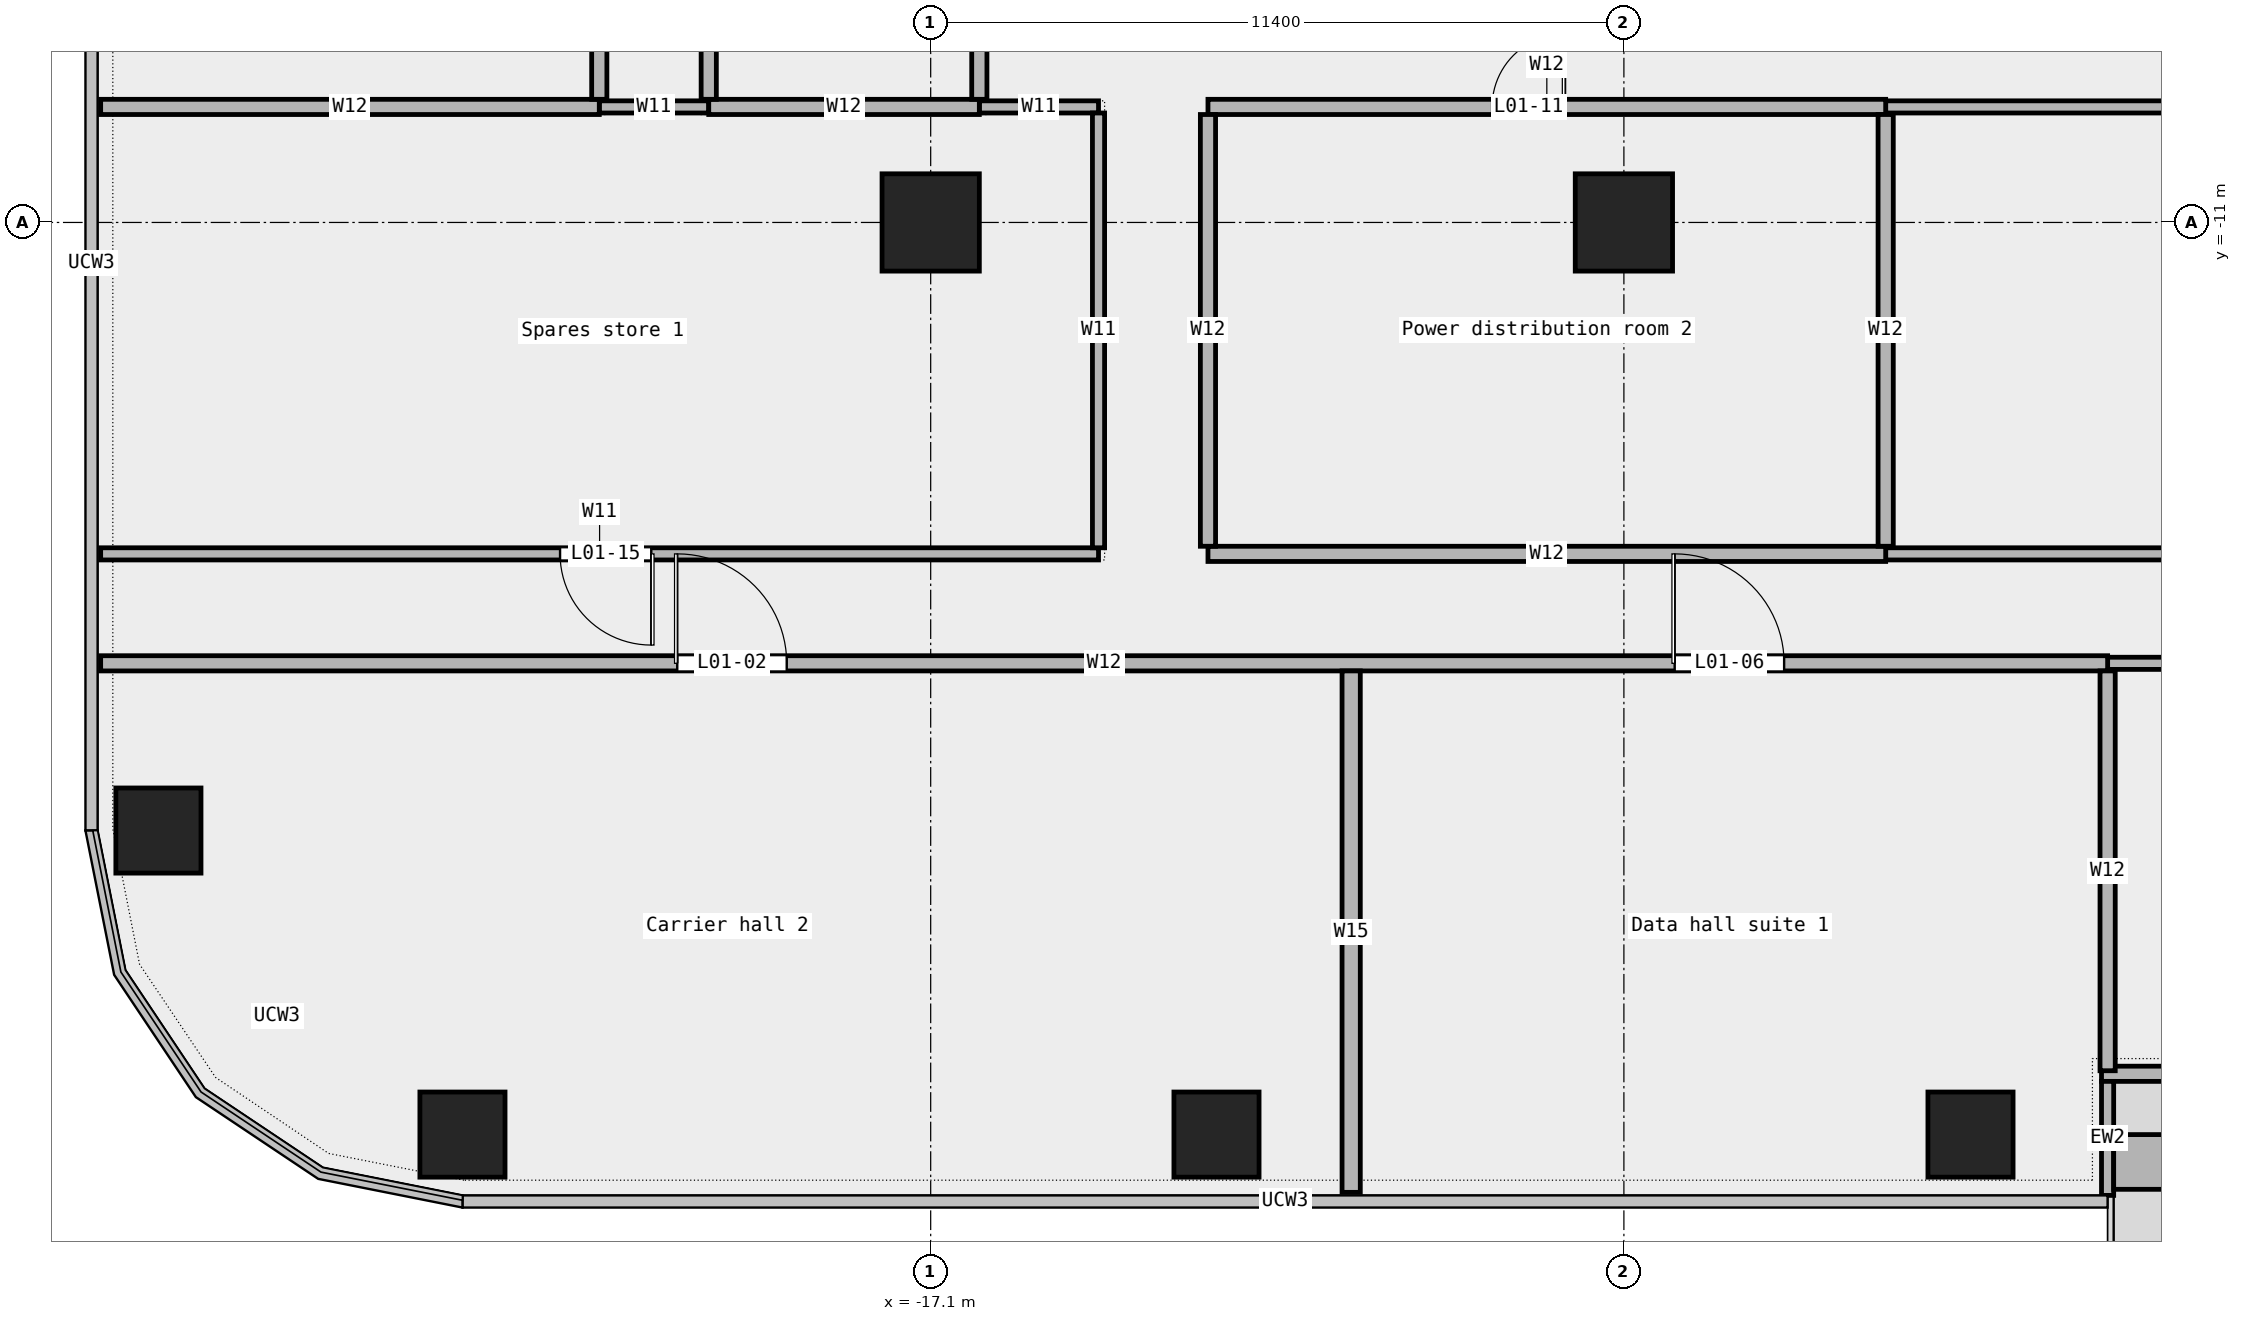
"""IFC4 building model, lengths in metres.
Left out: names, types, materials, properties, quantities, classifications, styles, units other than length and angle.
Written with IfcOpenShell. Run it as: python <this file> out.ifc"""

import sys

from ifc_helpers import new_model, si_unit, direction, frame, frame_2d, origin, origin_2d, place, context, subcontext, project, spatial, rectangle, extrude, element, fill, save


model = new_model("IFC4")
c1 = context("Model", 3, precision=1e-05, world=origin(), true_north=direction((0.0, 1.0)))
c2 = subcontext(c1, "Body", "Model", "MODEL_VIEW")
j1 = project(units=[si_unit("LENGTHUNIT", "METRE"), si_unit("PLANEANGLEUNIT", "RADIAN")], contexts=[c1])
p1 = place(None, origin())
s1 = spatial("IfcSite", under=j1, at=p1, CompositionType="ELEMENT")
p2 = place(p1, origin())
s2 = spatial("IfcBuilding", under=s1, at=p2, CompositionType="ELEMENT")
p3 = place(p2, frame((0.0, 0.0, 9.0)))
s3 = spatial("IfcBuildingStorey", under=s2, at=p3, CompositionType="ELEMENT", Elevation=9.0)
for number, where, z_axis, x_axis in (
    (1, (-24.8, -26.0, 0.0), (0.0, 0.0, 1.0), (1.0, 0.0, 0.0)),
    (2, (-12.4, -26.0, 0.0), (0.0, 0.0, 1.0), (1.0, 0.0, 0.0)),
    (3, (0.0, -26.0, 0.0), (0.0, 0.0, 1.0), (1.0, 0.0, 0.0)),
    (4, (-29.8, -21.0, 0.0), (0.0, 0.0, 1.0), (1.0, 0.0, 0.0)),
):
    element("IfcColumn", number, at=place(p3, frame(where, z_axis=z_axis, x_axis=x_axis)), inside=s3, PredefinedType="COLUMN", context=c2, shape_type="SweptSolid", body=[
        extrude(rectangle(XDim=1.4, YDim=1.4, at=origin_2d()), origin(), (0.0, 0.0, 1.0), 5.0),
    ])
for number, where, z_axis, x_axis in (
    (5, (-17.1, -11.0, 0.0), (0.0, 0.0, 1.0), (1.0, 0.0, 0.0)),
    (6, (-5.7, -11.0, 0.0), (0.0, 0.0, 1.0), (1.0, 0.0, 0.0)),
):
    element("IfcColumn", number, at=place(p3, frame(where, z_axis=z_axis, x_axis=x_axis)), inside=s3, PredefinedType="COLUMN", context=c2, shape_type="SweptSolid", body=[
        extrude(rectangle(XDim=1.6, YDim=1.6, at=origin_2d()), origin(), (0.0, 0.0, 1.0), 5.0),
    ])
p4 = place(p3, frame((2.155, -25.0, 0.0), z_axis=(0.0, 0.0, 1.0), x_axis=(1.0, 0.0, 0.0)))
e7 = element("IfcWall", 7, at=p4, inside=s3, PredefinedType="STANDARD", context=c2, shape_type="SweptSolid", body=[
    extrude(rectangle(XDim=13.727, YDim=0.25, at=frame_2d((6.864, 0.0))), origin(), (0.0, 0.0, 1.0), 5.0),
])
p5 = place(p4, frame((1.75, 0.0, 0.45)))
e8 = element("IfcOpeningElement", 8, at=p5, cuts=e7, PredefinedType="OPENING", context=c2, shape_type="SweptSolid", body=[
    extrude(rectangle(XDim=1.5, YDim=3.0, at=frame_2d((0.75, 1.5))), frame((0.0, 0.137, 0.0), z_axis=(0.0, -1.0, 0.0), x_axis=(1.0, 0.0, 0.0)), (0.0, 0.0, 1.0), 0.274),
])
p6 = place(p4, frame((6.0, 0.0, 0.0)))
e9 = element("IfcOpeningElement", 9, at=p6, cuts=e7, PredefinedType="OPENING", context=c2, shape_type="SweptSolid", body=[
    extrude(rectangle(XDim=1.8, YDim=2.4, at=frame_2d((0.9, 1.2))), frame((0.0, 0.137, 0.0), z_axis=(0.0, -1.0, 0.0), x_axis=(1.0, 0.0, 0.0)), (0.0, 0.0, 1.0), 0.274),
])
p7 = place(p4, frame((11.25, 0.0, 0.45)))
e10 = element("IfcOpeningElement", 10, at=p7, cuts=e7, PredefinedType="OPENING", context=c2, shape_type="SweptSolid", body=[
    extrude(rectangle(XDim=1.5, YDim=3.0, at=frame_2d((0.75, 1.5))), frame((0.0, 0.137, 0.0), z_axis=(0.0, -1.0, 0.0), x_axis=(1.0, 0.0, 0.0)), (0.0, 0.0, 1.0), 0.274),
])
p8 = place(p3, frame((2.255, -27.0, 0.0), z_axis=(0.0, 0.0, 1.0), x_axis=(0.0, 1.0, 0.0)))
e11 = element("IfcWall", 11, at=p8, inside=s3, PredefinedType="STANDARD", context=c2, shape_type="SweptSolid", body=[
    extrude(rectangle(XDim=1.875, YDim=0.2, at=frame_2d((0.938, 0.0))), origin(), (0.0, 0.0, 1.0), 5.0),
])
p9 = place(p3, frame((2.354, -26.45, 0.0), z_axis=(0.0, 0.0, 1.0), x_axis=(1.0, 0.0, 0.0)))
e12 = element("IfcWall", 12, at=p9, inside=s3, PredefinedType="STANDARD", context=c2, shape_type="SweptSolid", body=[
    extrude(rectangle(XDim=3.6, YDim=0.9, at=frame_2d((1.8, 0.0))), origin(), (0.0, 0.0, 1.0), 0.7),
])
p10 = place(p3, frame((2.255, -18.25, 0.0), z_axis=(0.0, 0.0, 1.0), x_axis=(1.0, 0.0, 0.0)))
e13 = element("IfcWall", 13, at=p10, inside=s3, PredefinedType="PARTITIONING", context=c2, shape_type="SweptSolid", body=[
    extrude(rectangle(XDim=13.525, YDim=0.2, at=frame_2d((6.763, 0.0))), origin(), (0.0, 0.0, 1.0), 5.0),
])
p11 = place(p10, frame((6.163, 0.0, 0.0)))
e14 = element("IfcOpeningElement", 14, at=p11, cuts=e13, PredefinedType="OPENING", context=c2, shape_type="SweptSolid", body=[
    extrude(rectangle(XDim=1.2, YDim=2.1, at=frame_2d((0.6, 1.05))), frame((0.0, 0.112, 0.0), z_axis=(0.0, -1.0, 0.0), x_axis=(1.0, 0.0, 0.0)), (0.0, 0.0, 1.0), 0.224),
])
p12 = place(p3, frame((-30.75, -18.25, 0.0), z_axis=(0.0, 0.0, 1.0), x_axis=(1.0, 0.0, 0.0)))
e15 = element("IfcWall", 15, at=p12, inside=s3, PredefinedType="PARTITIONING", context=c2, shape_type="SweptSolid", body=[
    extrude(rectangle(XDim=33.005, YDim=0.25, at=frame_2d((16.502, 0.0))), origin(), (0.0, 0.0, 1.0), 5.0),
])
p13 = place(p12, frame((9.482, 0.0, 0.0)))
e16 = element("IfcOpeningElement", 16, at=p13, cuts=e15, PredefinedType="OPENING", context=c2, shape_type="SweptSolid", body=[
    extrude(rectangle(XDim=1.8, YDim=2.1, at=frame_2d((0.9, 1.05))), frame((0.0, 0.137, 0.0), z_axis=(0.0, -1.0, 0.0), x_axis=(1.0, 0.0, 0.0)), (0.0, 0.0, 1.0), 0.274),
])
p14 = place(p12, frame((25.885, 0.0, 0.0)))
e17 = element("IfcOpeningElement", 17, at=p14, cuts=e15, PredefinedType="OPENING", context=c2, shape_type="SweptSolid", body=[
    extrude(rectangle(XDim=1.8, YDim=2.1, at=frame_2d((0.9, 1.05))), frame((0.0, 0.137, 0.0), z_axis=(0.0, -1.0, 0.0), x_axis=(1.0, 0.0, 0.0)), (0.0, 0.0, 1.0), 0.274),
])
p15 = place(p3, frame((-30.75, -16.45, 0.0), z_axis=(0.0, 0.0, 1.0), x_axis=(1.0, 0.0, 0.0)))
e18 = element("IfcWall", 18, at=p15, inside=s3, PredefinedType="PARTITIONING", context=c2, shape_type="SweptSolid", body=[
    extrude(rectangle(XDim=16.41, YDim=0.2, at=frame_2d((8.205, 0.0))), origin(), (0.0, 0.0, 1.0), 5.0),
])
p16 = place(p15, frame((7.555, 0.0, 0.0)))
e19 = element("IfcOpeningElement", 19, at=p16, cuts=e18, PredefinedType="OPENING", context=c2, shape_type="SweptSolid", body=[
    extrude(rectangle(XDim=1.5, YDim=2.1, at=frame_2d((0.75, 1.05))), frame((0.0, 0.112, 0.0), z_axis=(0.0, -1.0, 0.0), x_axis=(1.0, 0.0, 0.0)), (0.0, 0.0, 1.0), 0.224),
])
p17 = place(p3, frame((-1.395, -16.45, 0.0), z_axis=(0.0, 0.0, 1.0), x_axis=(1.0, 0.0, 0.0)))
e20 = element("IfcWall", 20, at=p17, inside=s3, PredefinedType="PARTITIONING", context=c2, shape_type="SweptSolid", body=[
    extrude(rectangle(XDim=13.935, YDim=0.2, at=frame_2d((6.968, 0.0))), origin(), (0.0, 0.0, 1.0), 5.0),
])
p18 = place(p3, frame((-12.54, -16.45, 0.0), z_axis=(0.0, 0.0, 1.0), x_axis=(1.0, 0.0, 0.0)))
e21 = element("IfcWall", 21, at=p18, inside=s3, PredefinedType="PARTITIONING", context=c2, shape_type="SweptSolid", body=[
    extrude(rectangle(XDim=11.145, YDim=0.25, at=frame_2d((5.573, 0.0))), origin(), (0.0, 0.0, 1.0), 5.0),
])
p19 = place(p3, frame((-22.55, -9.1, 0.0), z_axis=(0.0, 0.0, 1.0), x_axis=(1.0, 0.0, 0.0)))
e22 = element("IfcWall", 22, at=p19, inside=s3, PredefinedType="PARTITIONING", context=c2, shape_type="SweptSolid", body=[
    extrude(rectangle(XDim=1.8, YDim=0.2, at=frame_2d((0.9, 0.0))), origin(), (0.0, 0.0, 1.0), 5.0),
])
p20 = place(p3, frame((-16.3, -9.1, 0.0), z_axis=(0.0, 0.0, 1.0), x_axis=(1.0, 0.0, 0.0)))
e23 = element("IfcWall", 23, at=p20, inside=s3, PredefinedType="PARTITIONING", context=c2, shape_type="SweptSolid", body=[
    extrude(rectangle(XDim=1.96, YDim=0.2, at=frame_2d((0.98, 0.0))), origin(), (0.0, 0.0, 1.0), 5.0),
])
p21 = place(p3, frame((-1.395, -9.1, 0.0), z_axis=(0.0, 0.0, 1.0), x_axis=(1.0, 0.0, 0.0)))
e24 = element("IfcWall", 24, at=p21, inside=s3, PredefinedType="PARTITIONING", context=c2, shape_type="SweptSolid", body=[
    extrude(rectangle(XDim=13.935, YDim=0.2, at=frame_2d((6.968, 0.0))), origin(), (0.0, 0.0, 1.0), 5.0),
])
p22 = place(p21, frame((4.718, 0.0, 0.0)))
e25 = element("IfcOpeningElement", 25, at=p22, cuts=e24, PredefinedType="OPENING", context=c2, shape_type="SweptSolid", body=[
    extrude(rectangle(XDim=1.5, YDim=2.1, at=frame_2d((0.75, 1.05))), frame((0.0, 0.112, 0.0), z_axis=(0.0, -1.0, 0.0), x_axis=(1.0, 0.0, 0.0)), (0.0, 0.0, 1.0), 0.224),
])
p23 = place(p3, frame((-30.75, -9.1, 0.0), z_axis=(0.0, 0.0, 1.0), x_axis=(1.0, 0.0, 0.0)))
e26 = element("IfcWall", 26, at=p23, inside=s3, PredefinedType="PARTITIONING", context=c2, shape_type="SweptSolid", body=[
    extrude(rectangle(XDim=8.2, YDim=0.25, at=frame_2d((4.1, 0.0))), origin(), (0.0, 0.0, 1.0), 5.0),
])
p24 = place(p3, frame((-20.75, -9.1, 0.0), z_axis=(0.0, 0.0, 1.0), x_axis=(1.0, 0.0, 0.0)))
e27 = element("IfcWall", 27, at=p24, inside=s3, PredefinedType="PARTITIONING", context=c2, shape_type="SweptSolid", body=[
    extrude(rectangle(XDim=4.45, YDim=0.25, at=frame_2d((2.225, 0.0))), origin(), (0.0, 0.0, 1.0), 5.0),
])
p25 = place(p3, frame((-12.54, -9.1, 0.0), z_axis=(0.0, 0.0, 1.0), x_axis=(1.0, 0.0, 0.0)))
e28 = element("IfcWall", 28, at=p25, inside=s3, PredefinedType="PARTITIONING", context=c2, shape_type="SweptSolid", body=[
    extrude(rectangle(XDim=11.145, YDim=0.25, at=frame_2d((5.573, 0.0))), origin(), (0.0, 0.0, 1.0), 5.0),
])
p26 = place(p25, frame((4.673, 0.0, 0.0)))
e29 = element("IfcOpeningElement", 29, at=p26, cuts=e28, PredefinedType="OPENING", context=c2, shape_type="SweptSolid", body=[
    extrude(rectangle(XDim=1.2, YDim=2.1, at=frame_2d((0.6, 1.05))), frame((0.0, 0.137, 0.0), z_axis=(0.0, -1.0, 0.0), x_axis=(1.0, 0.0, 0.0)), (0.0, 0.0, 1.0), 0.274),
])
p27 = place(p3, frame((-22.55, -8.975, 0.0), z_axis=(0.0, 0.0, 1.0), x_axis=(0.0, 1.0, 0.0)))
e30 = element("IfcWall", 30, at=p27, inside=s3, PredefinedType="PARTITIONING", context=c2, shape_type="SweptSolid", body=[
    extrude(rectangle(XDim=6.515, YDim=0.25, at=frame_2d((3.258, 0.0))), origin(), (0.0, 0.0, 1.0), 5.0),
])
p28 = place(p27, frame((2.657, 0.0, 0.0)))
e31 = element("IfcOpeningElement", 31, at=p28, cuts=e30, PredefinedType="OPENING", context=c2, shape_type="SweptSolid", body=[
    extrude(rectangle(XDim=1.2, YDim=2.1, at=frame_2d((0.6, 1.05))), frame((0.0, 0.137, 0.0), z_axis=(0.0, -1.0, 0.0), x_axis=(1.0, 0.0, 0.0)), (0.0, 0.0, 1.0), 0.274),
])
p29 = place(p3, frame((-20.75, -8.975, 0.0), z_axis=(0.0, 0.0, 1.0), x_axis=(0.0, 1.0, 0.0)))
e32 = element("IfcWall", 32, at=p29, inside=s3, PredefinedType="PARTITIONING", context=c2, shape_type="SweptSolid", body=[
    extrude(rectangle(XDim=11.1, YDim=0.25, at=frame_2d((5.55, 0.0))), origin(), (0.0, 0.0, 1.0), 5.0),
])
p30 = place(p3, frame((-16.3, -8.975, 0.0), z_axis=(0.0, 0.0, 1.0), x_axis=(0.0, 1.0, 0.0)))
e33 = element("IfcWall", 33, at=p30, inside=s3, PredefinedType="PARTITIONING", context=c2, shape_type="SweptSolid", body=[
    extrude(rectangle(XDim=8.175, YDim=0.25, at=frame_2d((4.087, 0.0))), origin(), (0.0, 0.0, 1.0), 5.0),
])
p31 = place(p30, frame((3.488, 0.0, 0.0)))
e34 = element("IfcOpeningElement", 34, at=p31, cuts=e33, PredefinedType="OPENING", context=c2, shape_type="SweptSolid", body=[
    extrude(rectangle(XDim=1.2, YDim=2.1, at=frame_2d((0.6, 1.05))), frame((0.0, 0.137, 0.0), z_axis=(0.0, -1.0, 0.0), x_axis=(1.0, 0.0, 0.0)), (0.0, 0.0, 1.0), 0.274),
])
p32 = place(p3, frame((-14.34, -16.35, 0.0), z_axis=(0.0, 0.0, 1.0), x_axis=(0.0, 1.0, 0.0)))
e35 = element("IfcWall", 35, at=p32, inside=s3, PredefinedType="PARTITIONING", context=c2, shape_type="SweptSolid", body=[
    extrude(rectangle(XDim=7.15, YDim=0.2, at=frame_2d((3.575, 0.0))), origin(), (0.0, 0.0, 1.0), 5.0),
])
p33 = place(p3, frame((-12.54, -16.325, 0.0), z_axis=(0.0, 0.0, 1.0), x_axis=(0.0, 1.0, 0.0)))
e36 = element("IfcWall", 36, at=p33, inside=s3, PredefinedType="PARTITIONING", context=c2, shape_type="SweptSolid", body=[
    extrude(rectangle(XDim=7.1, YDim=0.25, at=frame_2d((3.55, 0.0))), origin(), (0.0, 0.0, 1.0), 5.0),
])
p34 = place(p3, frame((-10.185, -26.95, 0.0), z_axis=(0.0, 0.0, 1.0), x_axis=(0.0, 1.0, 0.0)))
e37 = element("IfcWall", 37, at=p34, inside=s3, PredefinedType="PARTITIONING", context=c2, shape_type="SweptSolid", body=[
    extrude(rectangle(XDim=8.575, YDim=0.3, at=frame_2d((4.288, 0.0))), origin(), (0.0, 0.0, 1.0), 5.0),
])
p35 = place(p3, frame((-1.395, -16.325, 0.0), z_axis=(0.0, 0.0, 1.0), x_axis=(0.0, 1.0, 0.0)))
e38 = element("IfcWall", 38, at=p35, inside=s3, PredefinedType="PARTITIONING", context=c2, shape_type="SweptSolid", body=[
    extrude(rectangle(XDim=7.1, YDim=0.25, at=frame_2d((3.55, 0.0))), origin(), (0.0, 0.0, 1.0), 5.0),
])
p36 = place(p3, frame((2.255, -24.95, 0.0), z_axis=(0.0, 0.0, 1.0), x_axis=(0.0, 1.0, 0.0)))
e39 = element("IfcWall", 39, at=p36, inside=s3, PredefinedType="PARTITIONING", context=c2, shape_type="SweptSolid", body=[
    extrude(rectangle(XDim=6.575, YDim=0.25, at=frame_2d((3.288, 0.0))), origin(), (0.0, 0.0, 1.0), 5.0),
])
p37 = place(p13, origin())
e40 = element("IfcDoor", 40, at=p37, inside=s3, OperationType="DOUBLE_DOOR_SINGLE_SWING", PredefinedType="DOOR", context=c2, shape_type="SweptSolid", body=[
    extrude(rectangle(XDim=1.8, YDim=2.1, at=frame_2d((0.9, 1.05))), frame((0.0, 0.025, 0.0), z_axis=(0.0, -1.0, 0.0), x_axis=(1.0, 0.0, 0.0)), (0.0, 0.0, 1.0), 0.05),
])
fill(e16, e40)
p38 = place(p14, origin())
e41 = element("IfcDoor", 41, at=p38, inside=s3, OperationType="DOUBLE_DOOR_SINGLE_SWING", PredefinedType="DOOR", context=c2, shape_type="SweptSolid", body=[
    extrude(rectangle(XDim=1.8, YDim=2.1, at=frame_2d((0.9, 1.05))), frame((0.0, 0.025, 0.0), z_axis=(0.0, -1.0, 0.0), x_axis=(1.0, 0.0, 0.0)), (0.0, 0.0, 1.0), 0.05),
])
fill(e17, e41)
p39 = place(p26, origin())
e42 = element("IfcDoor", 42, at=p39, inside=s3, OperationType="SINGLE_SWING_RIGHT", PredefinedType="DOOR", context=c2, shape_type="SweptSolid", body=[
    extrude(rectangle(XDim=1.2, YDim=2.1, at=frame_2d((0.6, 1.05))), frame((0.0, 0.025, 0.0), z_axis=(0.0, -1.0, 0.0), x_axis=(1.0, 0.0, 0.0)), (0.0, 0.0, 1.0), 0.05),
])
fill(e29, e42)
p40 = place(p16, origin())
e43 = element("IfcDoor", 43, at=p40, inside=s3, OperationType="DOUBLE_DOOR_SINGLE_SWING", PredefinedType="DOOR", context=c2, shape_type="SweptSolid", body=[
    extrude(rectangle(XDim=1.5, YDim=2.1, at=frame_2d((0.75, 1.05))), frame((0.0, 0.025, 0.0), z_axis=(0.0, -1.0, 0.0), x_axis=(1.0, 0.0, 0.0)), (0.0, 0.0, 1.0), 0.05),
])
fill(e19, e43)
save(model, sys.argv[1])
